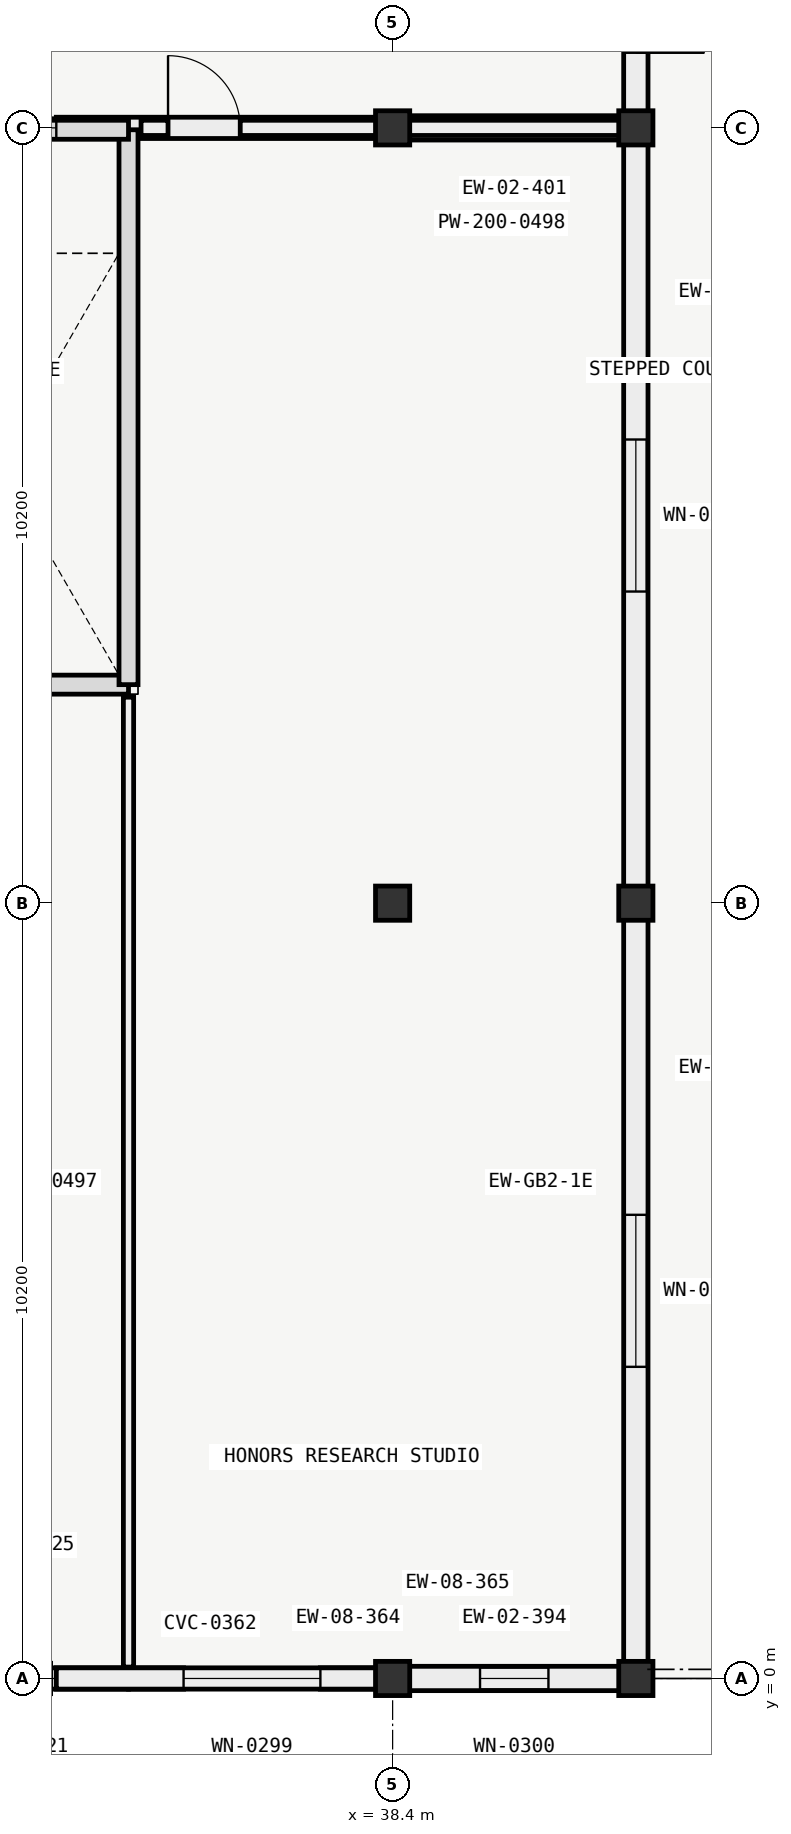
"""IFC4 building model, lengths in metres.
Left out: names, types, materials, properties, quantities, classifications, styles, units other than length and angle.
Written with IfcOpenShell. Run it as: python <this file> out.ifc"""

import sys

from ifc_helpers import new_model, si_unit, direction, frame, frame_2d, origin, origin_2d, place, context, subcontext, project, spatial, polyline, rectangle, outline, extrude, element, fill, save


model = new_model("IFC4")
c1 = context("Model", 3, precision=1e-05, world=origin(), true_north=direction((0.0, 1.0)))
c2 = subcontext(c1, "Body", "Model", "MODEL_VIEW")
j1 = project(units=[si_unit("LENGTHUNIT", "METRE"), si_unit("PLANEANGLEUNIT", "RADIAN")], contexts=[c1])
p1 = place(None, origin())
s1 = spatial("IfcSite", under=j1, at=p1, CompositionType="ELEMENT")
p2 = place(p1, origin())
s2 = spatial("IfcBuilding", under=s1, at=p2, CompositionType="ELEMENT")
p3 = place(p2, frame((0.0, 0.0, 30.6)))
s3 = spatial("IfcBuildingStorey", under=s2, at=p3, CompositionType="ELEMENT", Elevation=30.6)
for number, where, z_axis, x_axis in (
    (1, (38.4, 0.0, 0.0), (0.0, 0.0, 1.0), (1.0, 0.0, 0.0)),
    (2, (38.4, 10.2, 0.0), (0.0, 0.0, 1.0), (1.0, 0.0, 0.0)),
    (3, (38.4, 20.4, 0.0), (0.0, 0.0, 1.0), (1.0, 0.0, 0.0)),
    (4, (41.6, 0.0, 0.0), (0.0, 0.0, 1.0), (1.0, 0.0, 0.0)),
    (5, (41.6, 10.2, 0.0), (0.0, 0.0, 1.0), (1.0, 0.0, 0.0)),
    (6, (41.6, 20.4, 0.0), (0.0, 0.0, 1.0), (1.0, 0.0, 0.0)),
):
    element("IfcColumn", number, at=place(p3, frame(where, z_axis=z_axis, x_axis=x_axis)), inside=s3, PredefinedType="COLUMN", context=c2, shape_type="SweptSolid", body=[
        extrude(rectangle(XDim=0.45, YDim=0.45, at=origin_2d()), origin(), (0.0, 0.0, 1.0), 4.2),
    ])
p4 = place(p3, frame((34.925, 0.0, 0.0), z_axis=(0.0, 0.0, 1.0), x_axis=(-1.0, 0.0, 0.0)))
e7 = element("IfcWall", 7, at=p4, inside=s3, PredefinedType="SOLIDWALL", context=c2, shape_type="SweptSolid", body=[
    extrude(rectangle(XDim=1.024, YDim=0.28, at=frame_2d((0.512, 0.0))), origin(), (0.0, 0.0, 1.0), 3.3),
])
p5 = place(p3, frame((38.174, 0.0, 0.0), z_axis=(0.0, 0.0, 1.0), x_axis=(-1.0, 0.0, 0.0)))
e8 = element("IfcWall", 8, at=p5, inside=s3, PredefinedType="SOLIDWALL", context=c2, shape_type="SweptSolid", body=[
    extrude(rectangle(XDim=3.249, YDim=0.28, at=frame_2d((1.625, 0.0))), origin(), (0.0, 0.0, 1.0), 3.3),
])
p6 = place(p5, frame((0.725, 0.0, 0.8)))
e9 = element("IfcOpeningElement", 9, at=p6, cuts=e8, PredefinedType="OPENING", context=c2, shape_type="SweptSolid", body=[
    extrude(rectangle(XDim=1.8, YDim=2.1, at=frame_2d((0.9, 1.05))), frame((0.0, 0.15, 0.0), z_axis=(0.0, -1.0, 0.0), x_axis=(1.0, 0.0, 0.0)), (0.0, 0.0, 1.0), 0.3),
])
p7 = place(p3, frame((41.374, 0.0, 0.0), z_axis=(0.0, 0.0, 1.0), x_axis=(-1.0, 0.0, 0.0)))
e10 = element("IfcWall", 10, at=p7, inside=s3, PredefinedType="SOLIDWALL", context=c2, shape_type="SweptSolid", body=[
    extrude(rectangle(XDim=2.748, YDim=0.28, at=frame_2d((1.374, 0.0))), origin(), (0.0, 0.0, 1.0), 3.3),
])
p8 = place(p7, frame((0.924, 0.0, 0.8)))
e11 = element("IfcOpeningElement", 11, at=p8, cuts=e10, PredefinedType="OPENING", context=c2, shape_type="SweptSolid", body=[
    extrude(rectangle(XDim=0.9, YDim=2.2, at=frame_2d((0.45, 1.1))), frame((0.0, 0.15, 0.0), z_axis=(0.0, -1.0, 0.0), x_axis=(1.0, 0.0, 0.0)), (0.0, 0.0, 1.0), 0.3),
])
p9 = place(p3, frame((41.6, 9.974, 0.0), z_axis=(0.0, 0.0, 1.0), x_axis=(0.0, -1.0, 0.0)))
e12 = element("IfcWall", 12, at=p9, inside=s3, PredefinedType="SOLIDWALL", context=c2, shape_type="SweptSolid", body=[
    extrude(rectangle(XDim=9.748, YDim=0.28, at=frame_2d((4.874, 0.0))), origin(), (0.0, 0.0, 1.0), 3.3),
])
p10 = place(p9, frame((3.874, 0.0, 0.85)))
e13 = element("IfcOpeningElement", 13, at=p10, cuts=e12, PredefinedType="OPENING", context=c2, shape_type="SweptSolid", body=[
    extrude(rectangle(XDim=2.0, YDim=1.35, at=frame_2d((1.0, 0.675))), frame((0.0, 0.15, 0.0), z_axis=(0.0, -1.0, 0.0), x_axis=(1.0, 0.0, 0.0)), (0.0, 0.0, 1.0), 0.3),
])
p11 = place(p3, frame((41.6, 20.174, 0.0), z_axis=(0.0, 0.0, 1.0), x_axis=(0.0, -1.0, 0.0)))
e14 = element("IfcWall", 14, at=p11, inside=s3, PredefinedType="SOLIDWALL", context=c2, shape_type="SweptSolid", body=[
    extrude(rectangle(XDim=9.748, YDim=0.28, at=frame_2d((4.874, 0.0))), origin(), (0.0, 0.0, 1.0), 3.3),
])
p12 = place(p11, frame((3.874, 0.0, 0.85)))
e15 = element("IfcOpeningElement", 15, at=p12, cuts=e14, PredefinedType="OPENING", context=c2, shape_type="SweptSolid", body=[
    extrude(rectangle(XDim=2.0, YDim=1.35, at=frame_2d((1.0, 0.675))), frame((0.0, 0.15, 0.0), z_axis=(0.0, -1.0, 0.0), x_axis=(1.0, 0.0, 0.0)), (0.0, 0.0, 1.0), 0.3),
])
p13 = place(p3, frame((41.6, 23.95, 0.0), z_axis=(0.0, 0.0, 1.0), x_axis=(0.0, -1.0, 0.0)))
e16 = element("IfcWall", 16, at=p13, inside=s3, PredefinedType="SOLIDWALL", context=c2, shape_type="SweptSolid", body=[
    extrude(rectangle(XDim=3.324, YDim=0.28, at=frame_2d((1.662, 0.0))), origin(), (0.0, 0.0, 1.0), 3.3),
])
p14 = place(p13, frame((0.762, 0.0, 0.0)))
e17 = element("IfcOpeningElement", 17, at=p14, cuts=e16, PredefinedType="OPENING", context=c2, shape_type="SweptSolid", body=[
    extrude(rectangle(XDim=1.8, YDim=2.2, at=frame_2d((0.9, 1.1))), frame((0.0, 0.15, 0.0), z_axis=(0.0, -1.0, 0.0), x_axis=(1.0, 0.0, 0.0)), (0.0, 0.0, 1.0), 0.3),
])
p15 = place(p3, frame((38.299, 0.0, 4.2), z_axis=(0.0, 0.0, 1.0), x_axis=(-1.0, 0.0, 0.0)))
e18 = element("IfcWall", 18, at=p15, inside=s3, PredefinedType="SOLIDWALL", context=c2, shape_type="SweptSolid", body=[
    extrude(rectangle(XDim=9.398, YDim=0.28, at=frame_2d((4.699, 0.0))), origin(), (0.0, 0.0, 1.0), 2.396),
])
p16 = place(p15, frame((4.324, 0.0, 0.25)))
e19 = element("IfcOpeningElement", 19, at=p16, cuts=e18, PredefinedType="OPENING", context=c2, shape_type="SweptSolid", body=[
    extrude(rectangle(XDim=0.75, YDim=1.1, at=frame_2d((0.375, 0.55))), frame((0.0, 0.15, 0.0), z_axis=(0.0, -1.0, 0.0), x_axis=(1.0, 0.0, 0.0)), (0.0, 0.0, 1.0), 0.3),
])
p17 = place(p3, frame((38.4, 0.0, 4.2), z_axis=(0.0, 0.0, 1.0), x_axis=(1.0, 0.0, 0.0)))
e20 = element("IfcWall", 20, at=p17, inside=s3, PredefinedType="SOLIDWALL", context=c2, shape_type="SweptSolid", body=[
    extrude(rectangle(XDim=3.2, YDim=0.32, at=frame_2d((1.6, 0.0))), origin(), (0.0, 0.0, 1.0), 2.396),
])
p18 = place(p3, frame((41.6, 0.0, 4.2), z_axis=(0.0, 0.0, 1.0), x_axis=(0.0, 1.0, 0.0)))
e21 = element("IfcWall", 21, at=p18, inside=s3, PredefinedType="SOLIDWALL", context=c2, shape_type="SweptSolid", body=[
    extrude(outline(polyline([(0.0, 0.0), (20.4, 0.0), (20.4, 0.329), (0.0, 2.396), (0.0, 0.0)])), frame((0.0, 0.16, 0.0), z_axis=(0.0, -1.0, 0.0), x_axis=(1.0, 0.0, 0.0)), (0.0, 0.0, 1.0), 0.32),
])
p19 = place(p3, frame((38.4, 20.4, 4.2), z_axis=(0.0, 0.0, 1.0), x_axis=(-1.0, 0.0, 0.0)))
e22 = element("IfcWall", 22, at=p19, inside=s3, PredefinedType="SOLIDWALL", context=c2, shape_type="SweptSolid", body=[
    extrude(rectangle(XDim=9.6, YDim=0.28, at=frame_2d((4.8, 0.0))), origin(), (0.0, 0.0, 1.0), 2.279),
])
p20 = place(p19, frame((4.425, 0.0, 0.25)))
e23 = element("IfcOpeningElement", 23, at=p20, cuts=e22, PredefinedType="OPENING", context=c2, shape_type="SweptSolid", body=[
    extrude(rectangle(XDim=0.75, YDim=1.1, at=frame_2d((0.375, 0.55))), frame((0.0, 0.15, 0.0), z_axis=(0.0, -1.0, 0.0), x_axis=(1.0, 0.0, 0.0)), (0.0, 0.0, 1.0), 0.3),
])
p21 = place(p3, frame((38.4, 20.4, 4.2), z_axis=(0.0, 0.0, 1.0), x_axis=(1.0, 0.0, 0.0)))
e24 = element("IfcWall", 24, at=p21, inside=s3, PredefinedType="SOLIDWALL", context=c2, shape_type="SweptSolid", body=[
    extrude(rectangle(XDim=3.2, YDim=0.32, at=frame_2d((1.6, 0.0))), origin(), (0.0, 0.0, 1.0), 2.279),
])
p22 = place(p3, frame((41.6, 20.4, 4.2), z_axis=(0.0, 0.0, 1.0), x_axis=(0.0, 1.0, 0.0)))
e25 = element("IfcWall", 25, at=p22, inside=s3, PredefinedType="SOLIDWALL", context=c2, shape_type="SweptSolid", body=[
    extrude(outline(polyline([(0.0, 0.0), (14.0, 0.0), (14.0, 0.551), (0.0, 2.279), (0.0, 0.0)])), frame((0.0, 0.16, 0.0), z_axis=(0.0, -1.0, 0.0), x_axis=(1.0, 0.0, 0.0)), (0.0, 0.0, 1.0), 0.32),
])
p23 = place(p3, frame((31.475, 13.075, 0.0), z_axis=(0.0, 0.0, 1.0), x_axis=(1.0, 0.0, 0.0)))
e26 = element("IfcWall", 26, at=p23, inside=s3, PredefinedType="SOLIDWALL", context=c2, shape_type="SweptSolid", body=[
    extrude(rectangle(XDim=3.45, YDim=0.25, at=frame_2d((1.725, 0.0))), origin(), (0.0, 0.0, 1.0), 3.15),
])
p24 = place(p3, frame((34.925, 13.075, 0.0), z_axis=(0.0, 0.0, 1.0), x_axis=(0.0, 1.0, 0.0)))
e27 = element("IfcWall", 27, at=p24, inside=s3, PredefinedType="SOLIDWALL", context=c2, shape_type="SweptSolid", body=[
    extrude(rectangle(XDim=7.3, YDim=0.25, at=frame_2d((3.65, 0.0))), origin(), (0.0, 0.0, 1.0), 3.15),
])
p25 = place(p3, frame((34.925, 20.375, 0.0), z_axis=(0.0, 0.0, 1.0), x_axis=(-1.0, 0.0, 0.0)))
e28 = element("IfcWall", 28, at=p25, inside=s3, PredefinedType="SOLIDWALL", context=c2, shape_type="SweptSolid", body=[
    extrude(rectangle(XDim=3.45, YDim=0.25, at=frame_2d((1.725, 0.0))), origin(), (0.0, 0.0, 1.0), 3.15),
])
p26 = place(p25, frame((1.175, 0.0, 0.0)))
e29 = element("IfcOpeningElement", 29, at=p26, cuts=e28, PredefinedType="OPENING", context=c2, shape_type="SweptSolid", body=[
    extrude(rectangle(XDim=1.1, YDim=2.2, at=frame_2d((0.55, 1.1))), frame((0.0, 0.135, 0.0), z_axis=(0.0, -1.0, 0.0), x_axis=(1.0, 0.0, 0.0)), (0.0, 0.0, 1.0), 0.27),
])
p27 = place(p3, frame((34.925, 0.15, 0.0), z_axis=(0.0, 0.0, 1.0), x_axis=(0.0, 1.0, 0.0)))
e30 = element("IfcWall", 30, at=p27, inside=s3, PredefinedType="PARTITIONING", context=c2, shape_type="SweptSolid", body=[
    extrude(rectangle(XDim=12.76, YDim=0.135, at=frame_2d((6.38, 0.0))), origin(), (0.0, 0.0, 1.0), 3.85),
])
p28 = place(p3, frame((35.09, 20.4, 0.0), z_axis=(0.0, 0.0, 1.0), x_axis=(1.0, 0.0, 0.0)))
e31 = element("IfcWall", 31, at=p28, inside=s3, PredefinedType="PARTITIONING", context=c2, shape_type="SweptSolid", body=[
    extrude(rectangle(XDim=6.36, YDim=0.2, at=frame_2d((3.18, 0.0))), origin(), (0.0, 0.0, 1.0), 3.63),
])
p29 = place(p28, frame((0.355, 0.0, 0.0)))
e32 = element("IfcOpeningElement", 32, at=p29, cuts=e31, PredefinedType="OPENING", context=c2, shape_type="SweptSolid", body=[
    extrude(rectangle(XDim=0.95, YDim=2.1, at=frame_2d((0.475, 1.05))), frame((0.0, 0.11, 0.0), z_axis=(0.0, -1.0, 0.0), x_axis=(1.0, 0.0, 0.0)), (0.0, 0.0, 1.0), 0.22),
])
p30 = place(p6, origin())
e33 = element("IfcWindow", 33, at=p30, inside=s3, PartitioningType="SINGLE_PANEL", PredefinedType="WINDOW", context=c2, shape_type="SweptSolid", body=[
    extrude(rectangle(XDim=1.8, YDim=2.1, at=frame_2d((0.9, 1.05))), frame((0.0, 0.03, 0.0), z_axis=(0.0, -1.0, 0.0), x_axis=(1.0, 0.0, 0.0)), (0.0, 0.0, 1.0), 0.06),
])
fill(e9, e33)
p31 = place(p8, origin())
e34 = element("IfcWindow", 34, at=p31, inside=s3, PartitioningType="SINGLE_PANEL", PredefinedType="WINDOW", context=c2, shape_type="SweptSolid", body=[
    extrude(rectangle(XDim=0.9, YDim=2.2, at=frame_2d((0.45, 1.1))), frame((0.0, 0.03, 0.0), z_axis=(0.0, -1.0, 0.0), x_axis=(1.0, 0.0, 0.0)), (0.0, 0.0, 1.0), 0.06),
])
fill(e11, e34)
p32 = place(p10, origin())
e35 = element("IfcWindow", 35, at=p32, inside=s3, PartitioningType="SINGLE_PANEL", PredefinedType="WINDOW", context=c2, shape_type="SweptSolid", body=[
    extrude(rectangle(XDim=2.0, YDim=1.35, at=frame_2d((1.0, 0.675))), frame((0.0, 0.03, 0.0), z_axis=(0.0, -1.0, 0.0), x_axis=(1.0, 0.0, 0.0)), (0.0, 0.0, 1.0), 0.06),
])
fill(e13, e35)
p33 = place(p12, origin())
e36 = element("IfcWindow", 36, at=p33, inside=s3, PartitioningType="SINGLE_PANEL", PredefinedType="WINDOW", context=c2, shape_type="SweptSolid", body=[
    extrude(rectangle(XDim=2.0, YDim=1.35, at=frame_2d((1.0, 0.675))), frame((0.0, 0.03, 0.0), z_axis=(0.0, -1.0, 0.0), x_axis=(1.0, 0.0, 0.0)), (0.0, 0.0, 1.0), 0.06),
])
fill(e15, e36)
p34 = place(p14, origin())
e37 = element("IfcDoor", 37, at=p34, inside=s3, OperationType="DOUBLE_DOOR_SINGLE_SWING", PredefinedType="DOOR", context=c2, shape_type="SweptSolid", body=[
    extrude(rectangle(XDim=1.8, YDim=2.2, at=frame_2d((0.9, 1.1))), frame((0.0, 0.025, 0.0), z_axis=(0.0, -1.0, 0.0), x_axis=(1.0, 0.0, 0.0)), (0.0, 0.0, 1.0), 0.05),
])
fill(e17, e37)
p35 = place(p16, origin())
e38 = element("IfcWindow", 38, at=p35, inside=s3, PartitioningType="SINGLE_PANEL", PredefinedType="WINDOW", context=c2, shape_type="SweptSolid", body=[
    extrude(rectangle(XDim=0.75, YDim=1.1, at=frame_2d((0.375, 0.55))), frame((0.0, 0.03, 0.0), z_axis=(0.0, -1.0, 0.0), x_axis=(1.0, 0.0, 0.0)), (0.0, 0.0, 1.0), 0.06),
])
fill(e19, e38)
p36 = place(p20, origin())
e39 = element("IfcWindow", 39, at=p36, inside=s3, PartitioningType="SINGLE_PANEL", PredefinedType="WINDOW", context=c2, shape_type="SweptSolid", body=[
    extrude(rectangle(XDim=0.75, YDim=1.1, at=frame_2d((0.375, 0.55))), frame((0.0, 0.03, 0.0), z_axis=(0.0, -1.0, 0.0), x_axis=(1.0, 0.0, 0.0)), (0.0, 0.0, 1.0), 0.06),
])
fill(e23, e39)
p37 = place(p29, origin())
e40 = element("IfcDoor", 40, at=p37, inside=s3, OperationType="SINGLE_SWING_LEFT", PredefinedType="DOOR", context=c2, shape_type="SweptSolid", body=[
    extrude(rectangle(XDim=0.95, YDim=2.1, at=frame_2d((0.475, 1.05))), frame((0.0, 0.025, 0.0), z_axis=(0.0, -1.0, 0.0), x_axis=(1.0, 0.0, 0.0)), (0.0, 0.0, 1.0), 0.05),
])
fill(e32, e40)
save(model, sys.argv[1])
